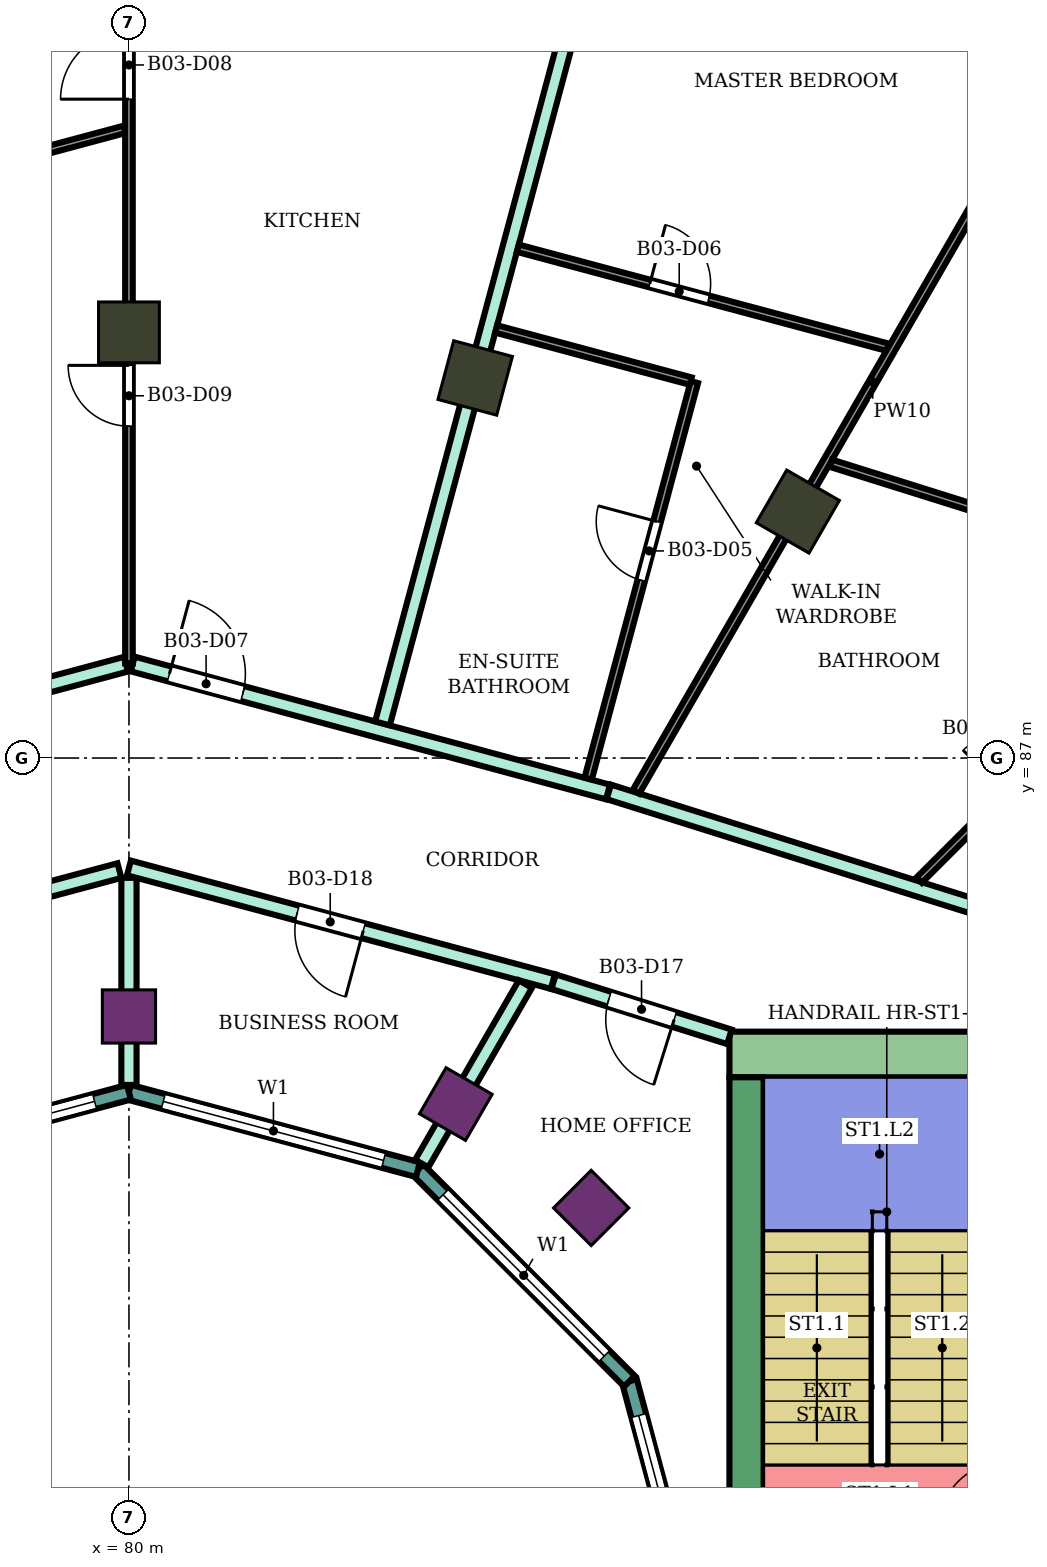
"""IFC4 building model, lengths in metres.
Left out: names, types, materials, properties, quantities, classifications, styles, units other than length and angle.
Written with IfcOpenShell. Run it as: python <this file> out.ifc"""

import sys

from ifc_helpers import new_model, si_unit, direction, frame, frame_2d, origin, origin_2d, place, context, subcontext, project, spatial, rectangle, extrude, element, fill, save


model = new_model("IFC4")
c1 = context("Model", 3, precision=1e-05, world=origin(), true_north=direction((0.0, 1.0)))
c2 = subcontext(c1, "Body", "Model", "MODEL_VIEW")
j1 = project(units=[si_unit("LENGTHUNIT", "METRE"), si_unit("PLANEANGLEUNIT", "RADIAN")], contexts=[c1])
p1 = place(None, origin())
s1 = spatial("IfcSite", under=j1, at=p1, CompositionType="ELEMENT")
p2 = place(p1, origin())
s2 = spatial("IfcBuilding", under=s1, at=p2, CompositionType="ELEMENT")
p3 = place(p2, frame((0.0, 0.0, 245.7)))
s3 = spatial("IfcBuildingStorey", under=s2, at=p3, CompositionType="ELEMENT", Elevation=245.7)
for number, where, z_axis, x_axis in (
    (1, (88.8, 90.242, 0.0), (0.0, 0.0, 1.0), (0.5, 0.866, 0.0)),
    (2, (84.555, 92.0, 0.0), (0.0, 0.0, 1.0), (0.259, 0.966, 0.0)),
    (3, (80.0, 92.6, 0.0), (0.0, 0.0, 1.0), (0.0, 1.0, 0.0)),
):
    element("IfcColumn", number, at=place(p3, frame(where, z_axis=z_axis, x_axis=x_axis)), inside=s3, PredefinedType="COLUMN", context=c2, shape_type="SweptSolid", body=[
        extrude(rectangle(XDim=0.8, YDim=0.8, at=origin_2d()), origin(), (0.0, 0.0, 1.0), 4.2),
    ])
for number, where, z_axis, x_axis in (
    (4, (86.081, 81.081, 0.0), (0.0, 0.0, 1.0), (0.707, 0.707, 0.0)),
    (5, (84.3, 82.448, 0.0), (0.0, 0.0, 1.0), (0.5, 0.866, 0.0)),
    (6, (80.0, 83.6, 0.0), (0.0, 0.0, 1.0), (0.0, 1.0, 0.0)),
):
    element("IfcColumn", number, at=place(p3, frame(where, z_axis=z_axis, x_axis=x_axis)), inside=s3, PredefinedType="COLUMN", context=c2, shape_type="SweptSolid", body=[
        extrude(rectangle(XDim=0.7, YDim=0.7, at=origin_2d()), origin(), (0.0, 0.0, 1.0), 4.2),
    ])
p4 = place(p3, frame((87.9, 83.1, 0.0), z_axis=(0.0, 0.0, 1.0), x_axis=(1.0, 0.0, 0.0)))
e7 = element("IfcWall", 7, at=p4, inside=s3, PredefinedType="SHEAR", context=c2, shape_type="SweptSolid", body=[
    extrude(rectangle(XDim=14.9, YDim=0.6, at=frame_2d((7.45, 0.0))), origin(), (0.0, 0.0, 1.0), 3.88),
])
p5 = place(p4, frame((4.2, 0.0, 0.0)))
e8 = element("IfcOpeningElement", 8, at=p5, cuts=e7, PredefinedType="OPENING", context=c2, shape_type="SweptSolid", body=[
    extrude(rectangle(XDim=2.4, YDim=2.4, at=frame_2d((1.2, 1.2))), frame((0.0, 0.31, 0.0), z_axis=(0.0, -1.0, 0.0), x_axis=(1.0, 0.0, 0.0)), (0.0, 0.0, 1.0), 0.62),
])
p6 = place(p3, frame((88.125, 75.0, 0.0), z_axis=(0.0, 0.0, 1.0), x_axis=(0.0, 1.0, 0.0)))
e9 = element("IfcWall", 9, at=p6, inside=s3, PredefinedType="SHEAR", context=c2, shape_type="SweptSolid", body=[
    extrude(rectangle(XDim=7.8, YDim=0.45, at=frame_2d((3.9, 0.0))), origin(), (0.0, 0.0, 1.0), 3.88),
])
p7 = place(p3, frame((87.604, 75.0, 0.0), z_axis=(0.0, 0.0, 1.0), x_axis=(-0.258789828301, 0.965933654434, 0.0)))
e10 = element("IfcWall", 10, at=p7, inside=s3, PredefinedType="NOTDEFINED", context=c2, shape_type="SweptSolid", body=[
    extrude(rectangle(XDim=3.936, YDim=0.2, at=frame_2d((1.968, 0.0))), origin(), (0.0, 0.0, 1.0), 4.2),
])
p8 = place(p7, frame((0.468, 0.0, 0.9)))
e11 = element("IfcOpeningElement", 11, at=p8, cuts=e10, PredefinedType="OPENING", context=c2, shape_type="SweptSolid", body=[
    extrude(rectangle(XDim=3.0, YDim=2.3, at=frame_2d((1.5, 1.15))), frame((0.0, 0.11, 0.0), z_axis=(0.0, -1.0, 0.0), x_axis=(1.0, 0.0, 0.0)), (0.0, 0.0, 1.0), 0.22),
])
p9 = place(p3, frame((86.585, 78.802, 0.0), z_axis=(0.0, 0.0, 1.0), x_axis=(-0.707106781187, 0.707106781187, 0.0)))
e12 = element("IfcWall", 12, at=p9, inside=s3, PredefinedType="NOTDEFINED", context=c2, shape_type="SweptSolid", body=[
    extrude(rectangle(XDim=3.936, YDim=0.2, at=frame_2d((1.968, 0.0))), origin(), (0.0, 0.0, 1.0), 4.2),
])
p10 = place(p9, frame((0.468, 0.0, 0.9)))
e13 = element("IfcOpeningElement", 13, at=p10, cuts=e12, PredefinedType="OPENING", context=c2, shape_type="SweptSolid", body=[
    extrude(rectangle(XDim=3.0, YDim=2.3, at=frame_2d((1.5, 1.15))), frame((0.0, 0.11, 0.0), z_axis=(0.0, -1.0, 0.0), x_axis=(1.0, 0.0, 0.0)), (0.0, 0.0, 1.0), 0.22),
])
p11 = place(p3, frame((83.802, 81.585, 0.0), z_axis=(0.0, 0.0, 1.0), x_axis=(-0.965933654434, 0.258789828301, 0.0)))
e14 = element("IfcWall", 14, at=p11, inside=s3, PredefinedType="NOTDEFINED", context=c2, shape_type="SweptSolid", body=[
    extrude(rectangle(XDim=3.936, YDim=0.2, at=frame_2d((1.968, 0.0))), origin(), (0.0, 0.0, 1.0), 4.2),
])
p12 = place(p11, frame((0.468, 0.0, 0.9)))
e15 = element("IfcOpeningElement", 15, at=p12, cuts=e14, PredefinedType="OPENING", context=c2, shape_type="SweptSolid", body=[
    extrude(rectangle(XDim=3.0, YDim=2.3, at=frame_2d((1.5, 1.15))), frame((0.0, 0.11, 0.0), z_axis=(0.0, -1.0, 0.0), x_axis=(1.0, 0.0, 0.0)), (0.0, 0.0, 1.0), 0.22),
])
p13 = place(p3, frame((80.0, 82.604, 0.0), z_axis=(0.0, 0.0, 1.0), x_axis=(-0.965933654434, -0.258789828301, 0.0)))
e16 = element("IfcWall", 16, at=p13, inside=s3, PredefinedType="NOTDEFINED", context=c2, shape_type="SweptSolid", body=[
    extrude(rectangle(XDim=3.936, YDim=0.2, at=frame_2d((1.968, 0.0))), origin(), (0.0, 0.0, 1.0), 4.2),
])
p14 = place(p13, frame((0.468, 0.0, 0.9)))
e17 = element("IfcOpeningElement", 17, at=p14, cuts=e16, PredefinedType="OPENING", context=c2, shape_type="SweptSolid", body=[
    extrude(rectangle(XDim=3.0, YDim=2.3, at=frame_2d((1.5, 1.15))), frame((0.0, 0.11, 0.0), z_axis=(0.0, -1.0, 0.0), x_axis=(1.0, 0.0, 0.0)), (0.0, 0.0, 1.0), 0.22),
])
p15 = place(p3, frame((73.687, 86.554, 0.0), z_axis=(0.0, 0.0, 1.0), x_axis=(0.96595928904, 0.258694128106, 0.0)))
e18 = element("IfcWall", 18, at=p15, inside=s3, PredefinedType="PARTITIONING", context=c2, shape_type="SweptSolid", body=[
    extrude(rectangle(XDim=6.496, YDim=0.2, at=frame_2d((3.248, 0.0))), origin(), (0.0, 0.0, 1.0), 3.75),
])
p16 = place(p15, frame((0.55, 0.0, 0.0)))
e19 = element("IfcOpeningElement", 19, at=p16, cuts=e18, PredefinedType="OPENING", context=c2, shape_type="SweptSolid", body=[
    extrude(rectangle(XDim=1.0, YDim=2.1, at=frame_2d((0.5, 1.05))), frame((0.0, 0.11, 0.0), z_axis=(0.0, -1.0, 0.0), x_axis=(1.0, 0.0, 0.0)), (0.0, 0.0, 1.0), 0.22),
])
p17 = place(p3, frame((74.413, 84.057, 0.0), z_axis=(0.0, 0.0, 1.0), x_axis=(0.965972135939, 0.258646153246, 0.0)))
e20 = element("IfcWall", 20, at=p17, inside=s3, PredefinedType="PARTITIONING", context=c2, shape_type="SweptSolid", body=[
    extrude(rectangle(XDim=5.654, YDim=0.2, at=frame_2d((2.827, 0.0))), origin(), (0.0, 0.0, 1.0), 3.75),
])
p18 = place(p17, frame((2.593, 0.0, 0.0)))
e21 = element("IfcOpeningElement", 21, at=p18, cuts=e20, PredefinedType="OPENING", context=c2, shape_type="SweptSolid", body=[
    extrude(rectangle(XDim=0.9, YDim=2.1, at=frame_2d((0.45, 1.05))), frame((0.0, 0.11, 0.0), z_axis=(0.0, -1.0, 0.0), x_axis=(1.0, 0.0, 0.0)), (0.0, 0.0, 1.0), 0.22),
])
p19 = place(p3, frame((80.0, 82.699, 0.0), z_axis=(0.0, 0.0, 1.0), x_axis=(0.0, 1.0, 0.0)))
e22 = element("IfcWall", 22, at=p19, inside=s3, PredefinedType="PARTITIONING", context=c2, shape_type="SweptSolid", body=[
    extrude(rectangle(XDim=2.725, YDim=0.2, at=frame_2d((1.363, 0.0))), origin(), (0.0, 0.0, 1.0), 3.75),
])
p20 = place(p3, frame((80.0, 85.554, 0.0), z_axis=(0.0, 0.0, 1.0), x_axis=(0.965928989968, -0.258807237802, 0.0)))
e23 = element("IfcWall", 23, at=p20, inside=s3, PredefinedType="PARTITIONING", context=c2, shape_type="SweptSolid", body=[
    extrude(rectangle(XDim=5.774, YDim=0.2, at=frame_2d((2.887, 0.0))), origin(), (0.0, 0.0, 1.0), 3.75),
])
p21 = place(p20, frame((2.292, 0.0, 0.0)))
e24 = element("IfcOpeningElement", 24, at=p21, cuts=e23, PredefinedType="OPENING", context=c2, shape_type="SweptSolid", body=[
    extrude(rectangle(XDim=0.9, YDim=2.1, at=frame_2d((0.45, 1.05))), frame((0.0, 0.11, 0.0), z_axis=(0.0, -1.0, 0.0), x_axis=(1.0, 0.0, 0.0)), (0.0, 0.0, 1.0), 0.22),
])
p22 = place(p3, frame((80.049, 88.237, 0.0), z_axis=(0.0, 0.0, 1.0), x_axis=(0.965582990495, -0.260095152718, 0.0)))
e25 = element("IfcWall", 25, at=p22, inside=s3, PredefinedType="PARTITIONING", context=c2, shape_type="SweptSolid", body=[
    extrude(rectangle(XDim=6.476, YDim=0.2, at=frame_2d((3.238, 0.0))), origin(), (0.0, 0.0, 1.0), 3.75),
])
p23 = place(p22, frame((0.5, 0.0, 0.0)))
e26 = element("IfcOpeningElement", 26, at=p23, cuts=e25, PredefinedType="OPENING", context=c2, shape_type="SweptSolid", body=[
    extrude(rectangle(XDim=1.0, YDim=2.1, at=frame_2d((0.5, 1.05))), frame((0.0, 0.11, 0.0), z_axis=(0.0, -1.0, 0.0), x_axis=(1.0, 0.0, 0.0)), (0.0, 0.0, 1.0), 0.22),
])
p24 = place(p3, frame((83.335, 87.456, 0.0), z_axis=(0.0, 0.0, 1.0), x_axis=(0.259184958139, 0.965827705895, 0.0)))
e27 = element("IfcWall", 27, at=p24, inside=s3, PredefinedType="PARTITIONING", context=c2, shape_type="SweptSolid", body=[
    extrude(rectangle(XDim=12.904, YDim=0.2, at=frame_2d((6.452, 0.0))), origin(), (0.0, 0.0, 1.0), 3.75),
])
p25 = place(p3, frame((83.852, 81.665, 0.0), z_axis=(0.0, 0.0, 1.0), x_axis=(0.500185068774, 0.865918527909, 0.0)))
e28 = element("IfcWall", 28, at=p25, inside=s3, PredefinedType="PARTITIONING", context=c2, shape_type="SweptSolid", body=[
    extrude(rectangle(XDim=2.726, YDim=0.2, at=frame_2d((1.363, 0.0))), origin(), (0.0, 0.0, 1.0), 3.75),
])
p26 = place(p3, frame((85.587, 84.057, 0.0), z_axis=(0.0, 0.0, 1.0), x_axis=(0.954239513179, -0.299043393987, 0.0)))
e29 = element("IfcWall", 29, at=p26, inside=s3, PredefinedType="PARTITIONING", context=c2, shape_type="SweptSolid", body=[
    extrude(rectangle(XDim=2.424, YDim=0.2, at=frame_2d((1.212, 0.0))), origin(), (0.0, 0.0, 1.0), 3.75),
])
p27 = place(p26, frame((0.762, 0.0, 0.0)))
e30 = element("IfcOpeningElement", 30, at=p27, cuts=e29, PredefinedType="OPENING", context=c2, shape_type="SweptSolid", body=[
    extrude(rectangle(XDim=0.9, YDim=2.1, at=frame_2d((0.45, 1.05))), frame((0.0, 0.11, 0.0), z_axis=(0.0, -1.0, 0.0), x_axis=(1.0, 0.0, 0.0)), (0.0, 0.0, 1.0), 0.22),
])
p28 = place(p3, frame((86.313, 86.554, 0.0), z_axis=(0.0, 0.0, 1.0), x_axis=(0.954081217458, -0.299548043717, 0.0)))
e31 = element("IfcWall", 31, at=p28, inside=s3, PredefinedType="PARTITIONING", context=c2, shape_type="SweptSolid", body=[
    extrude(rectangle(XDim=5.721, YDim=0.2, at=frame_2d((2.86, 0.0))), origin(), (0.0, 0.0, 1.0), 3.75),
])
p29 = place(p3, frame((75.035, 93.955, 0.0), z_axis=(0.0, 0.0, 1.0), x_axis=(0.965868648254, 0.259032342228, 0.0)))
e32 = element("IfcWall", 32, at=p29, inside=s3, PredefinedType="PARTITIONING", context=c2, shape_type="SweptSolid", body=[
    extrude(rectangle(XDim=5.08, YDim=0.1, at=frame_2d((2.54, 0.0))), origin(), (0.0, 0.0, 1.0), 3.75),
])
p30 = place(p3, frame((80.0, 88.246, 0.0), z_axis=(0.0, 0.0, 1.0), x_axis=(0.0, 1.0, 0.0)))
e33 = element("IfcWall", 33, at=p30, inside=s3, PredefinedType="PARTITIONING", context=c2, shape_type="SweptSolid", body=[
    extrude(rectangle(XDim=9.954, YDim=0.1, at=frame_2d((4.977, 0.0))), origin(), (0.0, 0.0, 1.0), 3.75),
])
p31 = place(p30, frame((7.422, 0.0, 0.0)))
e34 = element("IfcOpeningElement", 34, at=p31, cuts=e33, PredefinedType="OPENING", context=c2, shape_type="SweptSolid", body=[
    extrude(rectangle(XDim=0.9, YDim=2.1, at=frame_2d((0.45, 1.05))), frame((0.0, 0.06, 0.0), z_axis=(0.0, -1.0, 0.0), x_axis=(1.0, 0.0, 0.0)), (0.0, 0.0, 1.0), 0.12),
])
p32 = place(p30, frame((3.12, 0.0, 0.0)))
e35 = element("IfcOpeningElement", 35, at=p32, cuts=e33, PredefinedType="OPENING", context=c2, shape_type="SweptSolid", body=[
    extrude(rectangle(XDim=0.8, YDim=2.1, at=frame_2d((0.4, 1.05))), frame((0.0, 0.06, 0.0), z_axis=(0.0, -1.0, 0.0), x_axis=(1.0, 0.0, 0.0)), (0.0, 0.0, 1.0), 0.12),
])
p33 = place(p3, frame((84.831, 92.645, 0.0), z_axis=(0.0, 0.0, 1.0), x_axis=(0.965900745566, -0.258912629499, 0.0)))
e36 = element("IfcWall", 36, at=p33, inside=s3, PredefinedType="PARTITIONING", context=c2, shape_type="SweptSolid", body=[
    extrude(rectangle(XDim=2.65, YDim=0.1, at=frame_2d((1.325, 0.0))), origin(), (0.0, 0.0, 1.0), 3.75),
])
p34 = place(p3, frame((85.116, 93.707, 0.0), z_axis=(0.0, 0.0, 1.0), x_axis=(0.965979414561, -0.258618968068, 0.0)))
e37 = element("IfcWall", 37, at=p34, inside=s3, PredefinedType="PARTITIONING", context=c2, shape_type="SweptSolid", body=[
    extrude(rectangle(XDim=5.036, YDim=0.1, at=frame_2d((2.518, 0.0))), origin(), (0.0, 0.0, 1.0), 3.75),
])
p35 = place(p34, frame((1.798, 0.0, 0.0)))
e38 = element("IfcOpeningElement", 38, at=p35, cuts=e37, PredefinedType="OPENING", context=c2, shape_type="SweptSolid", body=[
    extrude(rectangle(XDim=0.8, YDim=2.1, at=frame_2d((0.4, 1.05))), frame((0.0, 0.06, 0.0), z_axis=(0.0, -1.0, 0.0), x_axis=(1.0, 0.0, 0.0)), (0.0, 0.0, 1.0), 0.12),
])
p36 = place(p3, frame((86.042, 86.731, 0.0), z_axis=(0.0, 0.0, 1.0), x_axis=(0.258737592043, 0.96594764789, 0.0)))
e39 = element("IfcWall", 39, at=p36, inside=s3, PredefinedType="PARTITIONING", context=c2, shape_type="SweptSolid", body=[
    extrude(rectangle(XDim=5.399, YDim=0.1, at=frame_2d((2.7, 0.0))), origin(), (0.0, 0.0, 1.0), 3.75),
])
p37 = place(p36, frame((2.7, 0.0, 0.0)))
e40 = element("IfcOpeningElement", 40, at=p37, cuts=e39, PredefinedType="OPENING", context=c2, shape_type="SweptSolid", body=[
    extrude(rectangle(XDim=0.8, YDim=2.1, at=frame_2d((0.4, 1.05))), frame((0.0, 0.06, 0.0), z_axis=(0.0, -1.0, 0.0), x_axis=(1.0, 0.0, 0.0)), (0.0, 0.0, 1.0), 0.12),
])
p38 = place(p3, frame((86.671, 86.554, 0.0), z_axis=(0.0, 0.0, 1.0), x_axis=(0.500104188531, 0.865965242151, 0.0)))
e41 = element("IfcWall", 41, at=p38, inside=s3, PredefinedType="PARTITIONING", context=c2, shape_type="SweptSolid", body=[
    extrude(rectangle(XDim=12.456, YDim=0.1, at=frame_2d((6.228, 0.0))), origin(), (0.0, 0.0, 1.0), 3.75),
])
p39 = place(p38, frame((9.111, 0.0, 0.0)))
e42 = element("IfcOpeningElement", 42, at=p39, cuts=e41, PredefinedType="OPENING", context=c2, shape_type="SweptSolid", body=[
    extrude(rectangle(XDim=0.9, YDim=2.1, at=frame_2d((0.45, 1.05))), frame((0.0, 0.06, 0.0), z_axis=(0.0, -1.0, 0.0), x_axis=(1.0, 0.0, 0.0)), (0.0, 0.0, 1.0), 0.12),
])
p40 = place(p3, frame((89.235, 90.878, 0.0), z_axis=(0.0, 0.0, 1.0), x_axis=(0.954193795587, -0.299189238548, 0.0)))
e43 = element("IfcWall", 43, at=p40, inside=s3, PredefinedType="PARTITIONING", context=c2, shape_type="SweptSolid", body=[
    extrude(rectangle(XDim=5.23, YDim=0.1, at=frame_2d((2.615, 0.0))), origin(), (0.0, 0.0, 1.0), 3.75),
])
p41 = place(p3, frame((90.396, 85.393, 0.0), z_axis=(0.0, 0.0, 1.0), x_axis=(0.707279106146, 0.706934414221, 0.0)))
e44 = element("IfcWall", 44, at=p41, inside=s3, PredefinedType="PARTITIONING", context=c2, shape_type="SweptSolid", body=[
    extrude(rectangle(XDim=8.5, YDim=0.1, at=frame_2d((4.25, 0.0))), origin(), (0.0, 0.0, 1.0), 3.75),
])
p42 = place(p41, frame((5.919, 0.0, 0.0)))
e45 = element("IfcOpeningElement", 45, at=p42, cuts=e44, PredefinedType="OPENING", context=c2, shape_type="SweptSolid", body=[
    extrude(rectangle(XDim=0.9, YDim=2.1, at=frame_2d((0.45, 1.05))), frame((0.0, 0.06, 0.0), z_axis=(0.0, -1.0, 0.0), x_axis=(1.0, 0.0, 0.0)), (0.0, 0.0, 1.0), 0.12),
])
p43 = place(p41, frame((1.617, 0.0, 0.0)))
e46 = element("IfcOpeningElement", 46, at=p43, cuts=e44, PredefinedType="OPENING", context=c2, shape_type="SweptSolid", body=[
    extrude(rectangle(XDim=0.8, YDim=2.1, at=frame_2d((0.4, 1.05))), frame((0.0, 0.06, 0.0), z_axis=(0.0, -1.0, 0.0), x_axis=(1.0, 0.0, 0.0)), (0.0, 0.0, 1.0), 0.12),
])
p44 = place(p8, origin())
e47 = element("IfcWindow", 47, at=p44, inside=s3, PartitioningType="SINGLE_PANEL", PredefinedType="WINDOW", context=c2, shape_type="SweptSolid", body=[
    extrude(rectangle(XDim=3.0, YDim=2.3, at=frame_2d((1.5, 1.15))), frame((0.0, 0.03, 0.0), z_axis=(0.0, -1.0, 0.0), x_axis=(1.0, 0.0, 0.0)), (0.0, 0.0, 1.0), 0.06),
])
fill(e11, e47)
p45 = place(p10, origin())
e48 = element("IfcWindow", 48, at=p45, inside=s3, PartitioningType="SINGLE_PANEL", PredefinedType="WINDOW", context=c2, shape_type="SweptSolid", body=[
    extrude(rectangle(XDim=3.0, YDim=2.3, at=frame_2d((1.5, 1.15))), frame((0.0, 0.03, 0.0), z_axis=(0.0, -1.0, 0.0), x_axis=(1.0, 0.0, 0.0)), (0.0, 0.0, 1.0), 0.06),
])
fill(e13, e48)
p46 = place(p12, origin())
e49 = element("IfcWindow", 49, at=p46, inside=s3, PartitioningType="SINGLE_PANEL", PredefinedType="WINDOW", context=c2, shape_type="SweptSolid", body=[
    extrude(rectangle(XDim=3.0, YDim=2.3, at=frame_2d((1.5, 1.15))), frame((0.0, 0.03, 0.0), z_axis=(0.0, -1.0, 0.0), x_axis=(1.0, 0.0, 0.0)), (0.0, 0.0, 1.0), 0.06),
])
fill(e15, e49)
p47 = place(p14, origin())
e50 = element("IfcWindow", 50, at=p47, inside=s3, PartitioningType="SINGLE_PANEL", PredefinedType="WINDOW", context=c2, shape_type="SweptSolid", body=[
    extrude(rectangle(XDim=3.0, YDim=2.3, at=frame_2d((1.5, 1.15))), frame((0.0, 0.03, 0.0), z_axis=(0.0, -1.0, 0.0), x_axis=(1.0, 0.0, 0.0)), (0.0, 0.0, 1.0), 0.06),
])
fill(e17, e50)
p48 = place(p37, origin())
e51 = element("IfcDoor", 51, at=p48, inside=s3, OperationType="SINGLE_SWING_RIGHT", PredefinedType="DOOR", context=c2, shape_type="SweptSolid", body=[
    extrude(rectangle(XDim=0.8, YDim=2.1, at=frame_2d((0.4, 1.05))), frame((0.0, 0.025, 0.0), z_axis=(0.0, -1.0, 0.0), x_axis=(1.0, 0.0, 0.0)), (0.0, 0.0, 1.0), 0.05),
])
fill(e40, e51)
p49 = place(p35, origin())
e52 = element("IfcDoor", 52, at=p49, inside=s3, OperationType="SINGLE_SWING_LEFT", PredefinedType="DOOR", context=c2, shape_type="SweptSolid", body=[
    extrude(rectangle(XDim=0.8, YDim=2.1, at=frame_2d((0.4, 1.05))), frame((0.0, 0.025, 0.0), z_axis=(0.0, -1.0, 0.0), x_axis=(1.0, 0.0, 0.0)), (0.0, 0.0, 1.0), 0.05),
])
fill(e38, e52)
p50 = place(p23, origin())
e53 = element("IfcDoor", 53, at=p50, inside=s3, OperationType="SINGLE_SWING_LEFT", PredefinedType="DOOR", context=c2, shape_type="SweptSolid", body=[
    extrude(rectangle(XDim=1.0, YDim=2.1, at=frame_2d((0.5, 1.05))), frame((0.0, 0.025, 0.0), z_axis=(0.0, -1.0, 0.0), x_axis=(1.0, 0.0, 0.0)), (0.0, 0.0, 1.0), 0.05),
])
fill(e26, e53)
p51 = place(p31, origin())
e54 = element("IfcDoor", 54, at=p51, inside=s3, OperationType="SINGLE_SWING_LEFT", PredefinedType="DOOR", context=c2, shape_type="SweptSolid", body=[
    extrude(rectangle(XDim=0.9, YDim=2.1, at=frame_2d((0.45, 1.05))), frame((0.0, 0.025, 0.0), z_axis=(0.0, -1.0, 0.0), x_axis=(1.0, 0.0, 0.0)), (0.0, 0.0, 1.0), 0.05),
])
fill(e34, e54)
p52 = place(p32, origin())
e55 = element("IfcDoor", 55, at=p52, inside=s3, OperationType="SINGLE_SWING_RIGHT", PredefinedType="DOOR", context=c2, shape_type="SweptSolid", body=[
    extrude(rectangle(XDim=0.8, YDim=2.1, at=frame_2d((0.4, 1.05))), frame((0.0, 0.025, 0.0), z_axis=(0.0, -1.0, 0.0), x_axis=(1.0, 0.0, 0.0)), (0.0, 0.0, 1.0), 0.05),
])
fill(e35, e55)
p53 = place(p27, frame((0.9, 0.0, 0.0), z_axis=(0.0, 0.0, 1.0), x_axis=(-1.0, 0.0, 0.0)))
e56 = element("IfcDoor", 56, at=p53, inside=s3, OperationType="SINGLE_SWING_LEFT", PredefinedType="DOOR", context=c2, shape_type="SweptSolid", body=[
    extrude(rectangle(XDim=0.9, YDim=2.1, at=frame_2d((0.45, 1.05))), frame((0.0, 0.025, 0.0), z_axis=(0.0, -1.0, 0.0), x_axis=(1.0, 0.0, 0.0)), (0.0, 0.0, 1.0), 0.05),
])
fill(e30, e56)
p54 = place(p21, frame((0.9, 0.0, 0.0), z_axis=(0.0, 0.0, 1.0), x_axis=(-1.0, 0.0, 0.0)))
e57 = element("IfcDoor", 57, at=p54, inside=s3, OperationType="SINGLE_SWING_LEFT", PredefinedType="DOOR", context=c2, shape_type="SweptSolid", body=[
    extrude(rectangle(XDim=0.9, YDim=2.1, at=frame_2d((0.45, 1.05))), frame((0.0, 0.025, 0.0), z_axis=(0.0, -1.0, 0.0), x_axis=(1.0, 0.0, 0.0)), (0.0, 0.0, 1.0), 0.05),
])
fill(e24, e57)
save(model, sys.argv[1])
